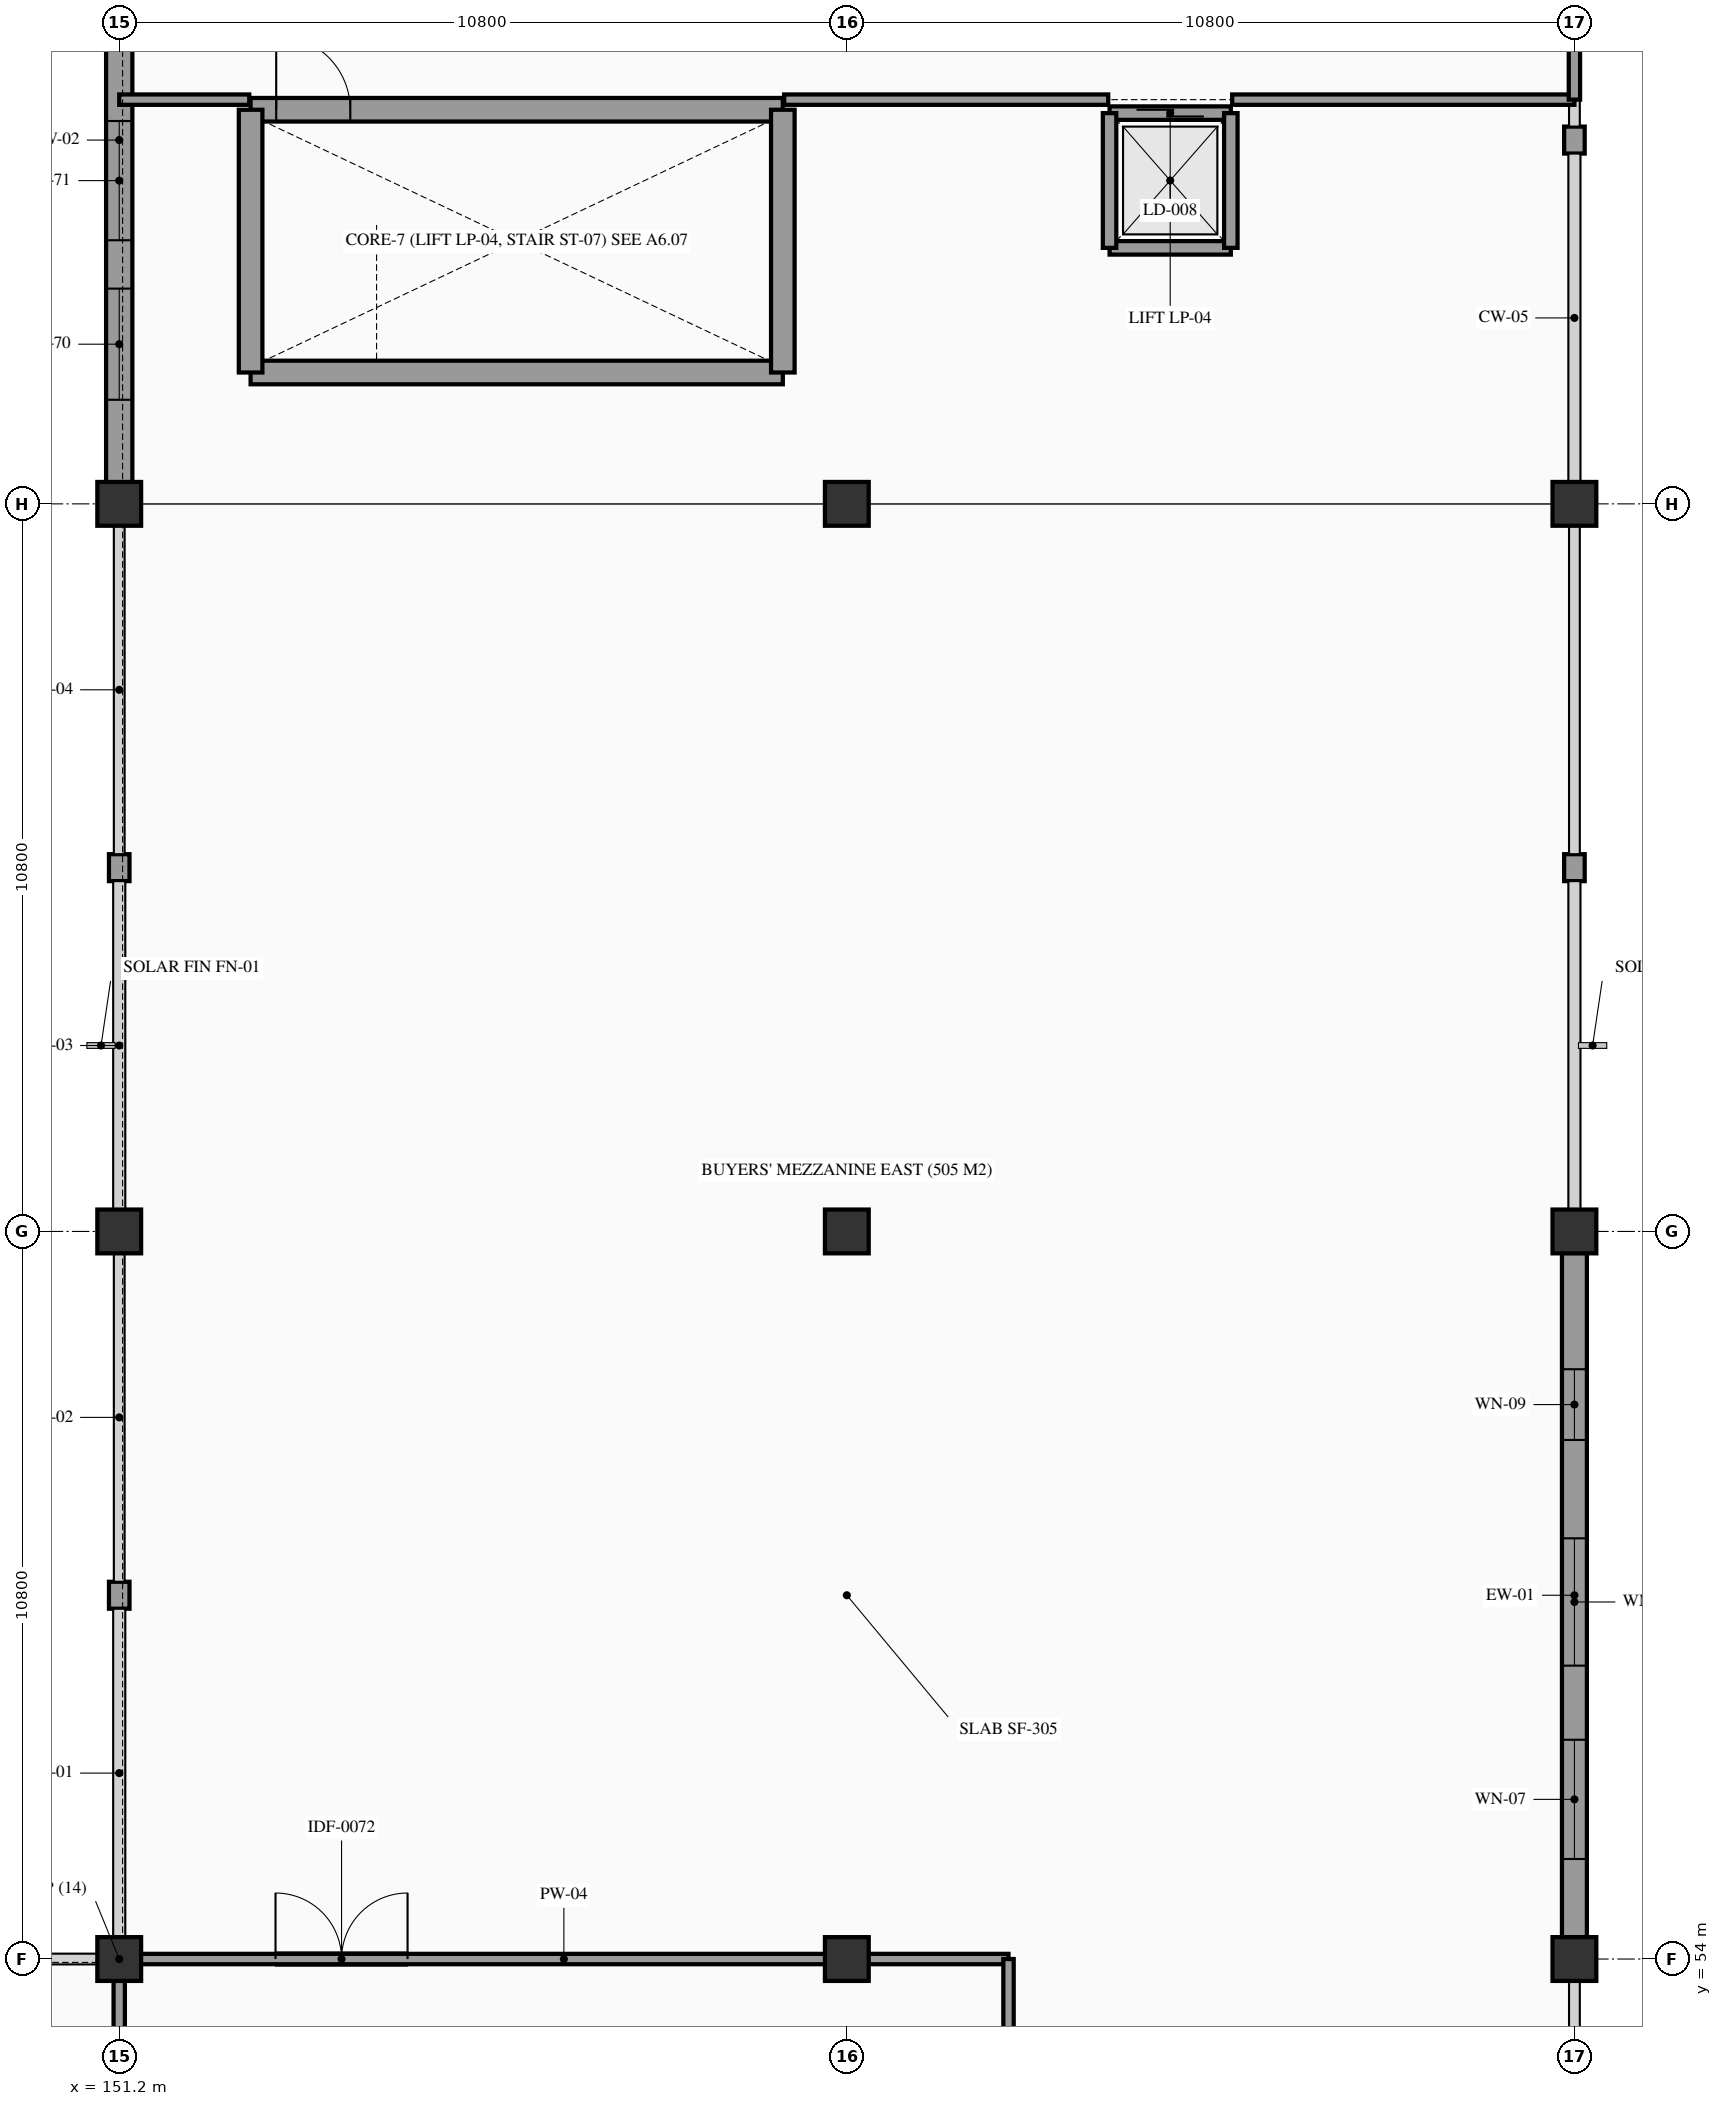
"""IFC4 building model, lengths in metres.
Left out: names, types, materials, properties, quantities, classifications, styles, units other than length and angle.
Written with IfcOpenShell. Run it as: python <this file> out.ifc"""

import sys

from ifc_helpers import new_model, si_unit, direction, frame, frame_2d, origin, origin_2d, place, context, subcontext, project, spatial, rectangle, extrude, element, fill, save


model = new_model("IFC4")
c1 = context("Model", 3, precision=1e-05, world=origin(), true_north=direction((0.0, 1.0)))
c2 = subcontext(c1, "Body", "Model", "MODEL_VIEW")
j1 = project(units=[si_unit("LENGTHUNIT", "METRE"), si_unit("PLANEANGLEUNIT", "RADIAN")], contexts=[c1])
p1 = place(None, origin())
s1 = spatial("IfcSite", under=j1, at=p1, CompositionType="ELEMENT")
p2 = place(p1, origin())
s2 = spatial("IfcBuilding", under=s1, at=p2, CompositionType="ELEMENT")
p3 = place(p2, frame((0.0, 0.0, 5.4)))
s3 = spatial("IfcBuildingStorey", under=s2, at=p3, CompositionType="ELEMENT", Elevation=5.4)
for number, where, z_axis, x_axis in (
    (1, (151.2, 54.0, 0.0), (0.0, 0.0, 1.0), (1.0, 0.0, 0.0)),
    (2, (151.2, 64.8, 0.0), (0.0, 0.0, 1.0), (1.0, 0.0, 0.0)),
    (3, (151.2, 75.6, 0.0), (0.0, 0.0, 1.0), (1.0, 0.0, 0.0)),
    (4, (162.0, 54.0, 0.0), (0.0, 0.0, 1.0), (1.0, 0.0, 0.0)),
    (5, (162.0, 64.8, 0.0), (0.0, 0.0, 1.0), (1.0, 0.0, 0.0)),
    (6, (162.0, 75.6, 0.0), (0.0, 0.0, 1.0), (1.0, 0.0, 0.0)),
    (7, (172.8, 54.0, 0.0), (0.0, 0.0, 1.0), (1.0, 0.0, 0.0)),
    (8, (172.8, 64.8, 0.0), (0.0, 0.0, 1.0), (1.0, 0.0, 0.0)),
    (9, (172.8, 75.6, 0.0), (0.0, 0.0, 1.0), (1.0, 0.0, 0.0)),
):
    element("IfcColumn", number, at=place(p3, frame(where, z_axis=z_axis, x_axis=x_axis)), inside=s3, PredefinedType="COLUMN", context=c2, shape_type="SweptSolid", body=[
        extrude(rectangle(XDim=0.65, YDim=0.65, at=origin_2d()), origin(), (0.0, 0.0, 1.0), 4.68),
    ])
p4 = place(p3, frame((151.2, 59.2, 0.0), z_axis=(0.0, 0.0, 1.0), x_axis=(0.0, 1.0, 0.0)))
e10 = element("IfcWall", 10, at=p4, inside=s3, PredefinedType="STANDARD", context=c2, shape_type="SweptSolid", body=[
    extrude(rectangle(XDim=0.4, YDim=0.305, at=frame_2d((0.2, 0.0))), origin(), (0.0, 0.0, 1.0), 3.53),
])
p5 = place(p3, frame((151.2, 70.0, 0.0), z_axis=(0.0, 0.0, 1.0), x_axis=(0.0, 1.0, 0.0)))
e11 = element("IfcWall", 11, at=p5, inside=s3, PredefinedType="STANDARD", context=c2, shape_type="SweptSolid", body=[
    extrude(rectangle(XDim=0.4, YDim=0.305, at=frame_2d((0.2, 0.0))), origin(), (0.0, 0.0, 1.0), 3.53),
])
p6 = place(p3, frame((151.2, 75.92, 0.0), z_axis=(0.0, 0.0, 1.0), x_axis=(0.0, 1.0, 0.0)))
e12 = element("IfcWall", 12, at=p6, inside=s3, PredefinedType="STANDARD", context=c2, shape_type="SweptSolid", body=[
    extrude(rectangle(XDim=10.16, YDim=0.39, at=frame_2d((5.08, 0.0))), origin(), (0.0, 0.0, 1.0), 3.53),
])
p7 = place(p6, frame((1.225, 0.0, 0.95)))
e13 = element("IfcOpeningElement", 13, at=p7, cuts=e12, PredefinedType="OPENING", context=c2, shape_type="SweptSolid", body=[
    extrude(rectangle(XDim=1.65, YDim=2.1, at=frame_2d((0.825, 1.05))), frame((0.0, 0.205, 0.0), z_axis=(0.0, -1.0, 0.0), x_axis=(1.0, 0.0, 0.0)), (0.0, 0.0, 1.0), 0.41),
])
p8 = place(p6, frame((3.593, 0.0, 0.95)))
e14 = element("IfcOpeningElement", 14, at=p8, cuts=e12, PredefinedType="OPENING", context=c2, shape_type="SweptSolid", body=[
    extrude(rectangle(XDim=1.77, YDim=2.1, at=frame_2d((0.885, 1.05))), frame((0.0, 0.205, 0.0), z_axis=(0.0, -1.0, 0.0), x_axis=(1.0, 0.0, 0.0)), (0.0, 0.0, 1.0), 0.41),
])
p9 = place(p6, frame((6.965, 0.0, 0.95)))
e15 = element("IfcOpeningElement", 15, at=p9, cuts=e12, PredefinedType="OPENING", context=c2, shape_type="SweptSolid", body=[
    extrude(rectangle(XDim=1.89, YDim=2.1, at=frame_2d((0.945, 1.05))), frame((0.0, 0.205, 0.0), z_axis=(0.0, -1.0, 0.0), x_axis=(1.0, 0.0, 0.0)), (0.0, 0.0, 1.0), 0.41),
])
p10 = place(p3, frame((172.8, 54.32, 0.0), z_axis=(0.0, 0.0, 1.0), x_axis=(0.0, 1.0, 0.0)))
e16 = element("IfcWall", 16, at=p10, inside=s3, PredefinedType="STANDARD", context=c2, shape_type="SweptSolid", body=[
    extrude(rectangle(XDim=10.16, YDim=0.37, at=frame_2d((5.08, 0.0))), origin(), (0.0, 0.0, 1.0), 2.38),
])
p11 = place(p10, frame((1.165, 0.0, 0.95)))
e17 = element("IfcOpeningElement", 17, at=p11, cuts=e16, PredefinedType="OPENING", context=c2, shape_type="SweptSolid", body=[
    extrude(rectangle(XDim=1.77, YDim=0.9, at=frame_2d((0.885, 0.45))), frame((0.0, 0.195, 0.0), z_axis=(0.0, -1.0, 0.0), x_axis=(1.0, 0.0, 0.0)), (0.0, 0.0, 1.0), 0.39),
])
p12 = place(p10, frame((4.035, 0.0, 0.95)))
e18 = element("IfcOpeningElement", 18, at=p12, cuts=e16, PredefinedType="OPENING", context=c2, shape_type="SweptSolid", body=[
    extrude(rectangle(XDim=1.89, YDim=0.9, at=frame_2d((0.945, 0.45))), frame((0.0, 0.195, 0.0), z_axis=(0.0, -1.0, 0.0), x_axis=(1.0, 0.0, 0.0)), (0.0, 0.0, 1.0), 0.39),
])
p13 = place(p10, frame((7.385, 0.0, 0.95)))
e19 = element("IfcOpeningElement", 19, at=p13, cuts=e16, PredefinedType="OPENING", context=c2, shape_type="SweptSolid", body=[
    extrude(rectangle(XDim=1.05, YDim=1.05, at=frame_2d((0.525, 0.525))), frame((0.0, 0.195, 0.0), z_axis=(0.0, -1.0, 0.0), x_axis=(1.0, 0.0, 0.0)), (0.0, 0.0, 1.0), 0.39),
])
for number, where, z_axis, x_axis in (
    (20, (172.8, 70.0, 0.0), (0.0, 0.0, 1.0), (0.0, 1.0, 0.0)),
    (21, (172.8, 80.8, 0.0), (0.0, 0.0, 1.0), (0.0, 1.0, 0.0)),
):
    element("IfcWall", number, at=place(p3, frame(where, z_axis=z_axis, x_axis=x_axis)), inside=s3, PredefinedType="STANDARD", context=c2, shape_type="SweptSolid", body=[
        extrude(rectangle(XDim=0.4, YDim=0.305, at=frame_2d((0.2, 0.0))), origin(), (0.0, 0.0, 1.0), 2.38),
    ])
p14 = place(p3, frame((153.15, 77.55, 0.0), z_axis=(0.0, 0.0, 1.0), x_axis=(1.0, 0.0, 0.0)))
e22 = element("IfcWall", 22, at=p14, inside=s3, PredefinedType="SHEAR", context=c2, shape_type="SweptSolid", body=[
    extrude(rectangle(XDim=7.9, YDim=0.35, at=frame_2d((3.95, 0.0))), origin(), (0.0, 0.0, 1.0), 4.68),
])
p15 = place(p3, frame((153.15, 81.45, 0.0), z_axis=(0.0, 0.0, 1.0), x_axis=(1.0, 0.0, 0.0)))
e23 = element("IfcWall", 23, at=p15, inside=s3, PredefinedType="SHEAR", context=c2, shape_type="SweptSolid", body=[
    extrude(rectangle(XDim=7.9, YDim=0.35, at=frame_2d((3.95, 0.0))), origin(), (0.0, 0.0, 1.0), 4.68),
])
p16 = place(p15, frame((0.38, 0.0, 0.0)))
e24 = element("IfcOpeningElement", 24, at=p16, cuts=e23, PredefinedType="OPENING", context=c2, shape_type="SweptSolid", body=[
    extrude(rectangle(XDim=1.1, YDim=2.2, at=frame_2d((0.55, 1.1))), frame((0.0, 0.185, 0.0), z_axis=(0.0, -1.0, 0.0), x_axis=(1.0, 0.0, 0.0)), (0.0, 0.0, 1.0), 0.37),
])
for number, where, z_axis, x_axis in (
    (25, (153.15, 77.55, 0.0), (0.0, 0.0, 1.0), (0.0, 1.0, 0.0)),
    (26, (161.05, 77.55, 0.0), (0.0, 0.0, 1.0), (0.0, 1.0, 0.0)),
):
    element("IfcWall", number, at=place(p3, frame(where, z_axis=z_axis, x_axis=x_axis)), inside=s3, PredefinedType="SHEAR", context=c2, shape_type="SweptSolid", body=[
        extrude(rectangle(XDim=3.9, YDim=0.35, at=frame_2d((1.95, 0.0))), origin(), (0.0, 0.0, 1.0), 4.68),
    ])
p17 = place(p3, frame((165.9, 79.4, 0.0), z_axis=(0.0, 0.0, 1.0), x_axis=(1.0, 0.0, 0.0)))
e27 = element("IfcWall", 27, at=p17, inside=s3, PredefinedType="SOLIDWALL", context=c2, shape_type="SweptSolid", body=[
    extrude(rectangle(XDim=1.8, YDim=0.2, at=frame_2d((0.9, 0.0))), origin(), (0.0, 0.0, 1.0), 3.5),
])
p18 = place(p3, frame((165.9, 81.4, 0.0), z_axis=(0.0, 0.0, 1.0), x_axis=(1.0, 0.0, 0.0)))
e28 = element("IfcWall", 28, at=p18, inside=s3, PredefinedType="SOLIDWALL", context=c2, shape_type="SweptSolid", body=[
    extrude(rectangle(XDim=1.8, YDim=0.2, at=frame_2d((0.9, 0.0))), origin(), (0.0, 0.0, 1.0), 3.5),
])
p19 = place(p18, frame((0.4, 0.0, 0.0)))
e29 = element("IfcOpeningElement", 29, at=p19, cuts=e28, PredefinedType="OPENING", context=c2, shape_type="SweptSolid", body=[
    extrude(rectangle(XDim=1.0, YDim=2.15, at=frame_2d((0.5, 1.075))), frame((0.0, 0.11, 0.0), z_axis=(0.0, -1.0, 0.0), x_axis=(1.0, 0.0, 0.0)), (0.0, 0.0, 1.0), 0.22),
])
for number, where, z_axis, x_axis in (
    (30, (165.9, 79.4, 0.0), (0.0, 0.0, 1.0), (0.0, 1.0, 0.0)),
    (31, (167.7, 79.4, 0.0), (0.0, 0.0, 1.0), (0.0, 1.0, 0.0)),
):
    element("IfcWall", number, at=place(p3, frame(where, z_axis=z_axis, x_axis=x_axis)), inside=s3, PredefinedType="SOLIDWALL", context=c2, shape_type="SweptSolid", body=[
        extrude(rectangle(XDim=2.0, YDim=0.2, at=frame_2d((1.0, 0.0))), origin(), (0.0, 0.0, 1.0), 3.5),
    ])
p20 = place(p3, frame((151.2, 48.6, 0.0), z_axis=(0.0, 0.0, 1.0), x_axis=(0.0, 1.0, 0.0)))
e32 = element("IfcWall", 32, at=p20, inside=s3, PredefinedType="PARTITIONING", context=c2, shape_type="SweptSolid", body=[
    extrude(rectangle(XDim=5.4, YDim=0.168, at=frame_2d((2.7, 0.0))), origin(), (0.0, 0.0, 1.0), 3.23),
])
p21 = place(p20, frame((0.37, 0.0, 0.0)))
e33 = element("IfcOpeningElement", 33, at=p21, cuts=e32, PredefinedType="OPENING", context=c2, shape_type="SweptSolid", body=[
    extrude(rectangle(XDim=1.96, YDim=2.3, at=frame_2d((0.98, 1.15))), frame((0.0, 0.094, 0.0), z_axis=(0.0, -1.0, 0.0), x_axis=(1.0, 0.0, 0.0)), (0.0, 0.0, 1.0), 0.188),
])
p22 = place(p3, frame((151.2, 54.0, 0.0), z_axis=(0.0, 0.0, 1.0), x_axis=(1.0, 0.0, 0.0)))
e34 = element("IfcWall", 34, at=p22, inside=s3, PredefinedType="PARTITIONING", context=c2, shape_type="SweptSolid", body=[
    extrude(rectangle(XDim=13.2, YDim=0.154, at=frame_2d((6.6, 0.0))), origin(), (0.0, 0.0, 1.0), 3.23),
])
p23 = place(p22, frame((2.32, 0.0, 0.0)))
e35 = element("IfcOpeningElement", 35, at=p23, cuts=e34, PredefinedType="OPENING", context=c2, shape_type="SweptSolid", body=[
    extrude(rectangle(XDim=1.96, YDim=2.3, at=frame_2d((0.98, 1.15))), frame((0.0, 0.087, 0.0), z_axis=(0.0, -1.0, 0.0), x_axis=(1.0, 0.0, 0.0)), (0.0, 0.0, 1.0), 0.174),
])
p24 = place(p3, frame((151.2, 81.6, 0.0), z_axis=(0.0, 0.0, 1.0), x_axis=(1.0, 0.0, 0.0)))
e36 = element("IfcWall", 36, at=p24, inside=s3, PredefinedType="PARTITIONING", context=c2, shape_type="SweptSolid", body=[
    extrude(rectangle(XDim=1.93, YDim=0.154, at=frame_2d((0.965, 0.0))), origin(), (0.0, 0.0, 1.0), 3.23),
])
p25 = place(p3, frame((161.07, 81.6, 0.0), z_axis=(0.0, 0.0, 1.0), x_axis=(1.0, 0.0, 0.0)))
e37 = element("IfcWall", 37, at=p25, inside=s3, PredefinedType="PARTITIONING", context=c2, shape_type="SweptSolid", body=[
    extrude(rectangle(XDim=4.81, YDim=0.154, at=frame_2d((2.405, 0.0))), origin(), (0.0, 0.0, 1.0), 3.23),
])
p26 = place(p3, frame((167.72, 81.6, 0.0), z_axis=(0.0, 0.0, 1.0), x_axis=(1.0, 0.0, 0.0)))
e38 = element("IfcWall", 38, at=p26, inside=s3, PredefinedType="PARTITIONING", context=c2, shape_type="SweptSolid", body=[
    extrude(rectangle(XDim=5.08, YDim=0.154, at=frame_2d((2.54, 0.0))), origin(), (0.0, 0.0, 1.0), 3.23),
])
p27 = place(p3, frame((164.4, 48.6, 0.0), z_axis=(0.0, 0.0, 1.0), x_axis=(0.0, 1.0, 0.0)))
e39 = element("IfcWall", 39, at=p27, inside=s3, PredefinedType="PARTITIONING", context=c2, shape_type="SweptSolid", body=[
    extrude(rectangle(XDim=5.4, YDim=0.154, at=frame_2d((2.7, 0.0))), origin(), (0.0, 0.0, 1.0), 3.23),
])
p28 = place(p3, frame((172.8, 81.6, 0.0), z_axis=(0.0, 0.0, 1.0), x_axis=(0.0, 1.0, 0.0)))
e40 = element("IfcWall", 40, at=p28, inside=s3, PredefinedType="PARTITIONING", context=c2, shape_type="SweptSolid", body=[
    extrude(rectangle(XDim=4.8, YDim=0.168, at=frame_2d((2.4, 0.0))), origin(), (0.0, 0.0, 1.0), 2.38),
])
p29 = place(p7, origin())
e41 = element("IfcWindow", 41, at=p29, inside=s3, PartitioningType="SINGLE_PANEL", PredefinedType="WINDOW", context=c2, shape_type="SweptSolid", body=[
    extrude(rectangle(XDim=1.65, YDim=2.1, at=frame_2d((0.825, 1.05))), frame((0.0, 0.03, 0.0), z_axis=(0.0, -1.0, 0.0), x_axis=(1.0, 0.0, 0.0)), (0.0, 0.0, 1.0), 0.06),
])
fill(e13, e41)
p30 = place(p8, origin())
e42 = element("IfcWindow", 42, at=p30, inside=s3, PartitioningType="SINGLE_PANEL", PredefinedType="WINDOW", context=c2, shape_type="SweptSolid", body=[
    extrude(rectangle(XDim=1.77, YDim=2.1, at=frame_2d((0.885, 1.05))), frame((0.0, 0.03, 0.0), z_axis=(0.0, -1.0, 0.0), x_axis=(1.0, 0.0, 0.0)), (0.0, 0.0, 1.0), 0.06),
])
fill(e14, e42)
p31 = place(p11, frame((1.77, 0.0, 0.0), z_axis=(0.0, 0.0, 1.0), x_axis=(-1.0, 0.0, 0.0)))
e43 = element("IfcWindow", 43, at=p31, inside=s3, PartitioningType="SINGLE_PANEL", PredefinedType="WINDOW", context=c2, shape_type="SweptSolid", body=[
    extrude(rectangle(XDim=1.77, YDim=0.9, at=frame_2d((0.885, 0.45))), frame((0.0, 0.03, 0.0), z_axis=(0.0, -1.0, 0.0), x_axis=(1.0, 0.0, 0.0)), (0.0, 0.0, 1.0), 0.06),
])
fill(e17, e43)
p32 = place(p12, frame((1.89, 0.0, 0.0), z_axis=(0.0, 0.0, 1.0), x_axis=(-1.0, 0.0, 0.0)))
e44 = element("IfcWindow", 44, at=p32, inside=s3, PartitioningType="SINGLE_PANEL", PredefinedType="WINDOW", context=c2, shape_type="SweptSolid", body=[
    extrude(rectangle(XDim=1.89, YDim=0.9, at=frame_2d((0.945, 0.45))), frame((0.0, 0.03, 0.0), z_axis=(0.0, -1.0, 0.0), x_axis=(1.0, 0.0, 0.0)), (0.0, 0.0, 1.0), 0.06),
])
fill(e18, e44)
p33 = place(p13, frame((1.05, 0.0, 0.0), z_axis=(0.0, 0.0, 1.0), x_axis=(-1.0, 0.0, 0.0)))
e45 = element("IfcWindow", 45, at=p33, inside=s3, PartitioningType="SINGLE_PANEL", PredefinedType="WINDOW", context=c2, shape_type="SweptSolid", body=[
    extrude(rectangle(XDim=1.05, YDim=1.05, at=frame_2d((0.525, 0.525))), frame((0.0, 0.03, 0.0), z_axis=(0.0, -1.0, 0.0), x_axis=(1.0, 0.0, 0.0)), (0.0, 0.0, 1.0), 0.06),
])
fill(e19, e45)
p34 = place(p16, origin())
e46 = element("IfcDoor", 46, at=p34, inside=s3, OperationType="SINGLE_SWING_LEFT", PredefinedType="DOOR", context=c2, shape_type="SweptSolid", body=[
    extrude(rectangle(XDim=1.1, YDim=2.2, at=frame_2d((0.55, 1.1))), frame((0.0, 0.025, 0.0), z_axis=(0.0, -1.0, 0.0), x_axis=(1.0, 0.0, 0.0)), (0.0, 0.0, 1.0), 0.05),
])
fill(e24, e46)
p35 = place(p19, origin())
e47 = element("IfcDoor", 47, at=p35, inside=s3, OperationType="DOUBLE_DOOR_SLIDING", PredefinedType="DOOR", context=c2, shape_type="SweptSolid", body=[
    extrude(rectangle(XDim=1.0, YDim=2.15, at=frame_2d((0.5, 1.075))), frame((0.0, 0.025, 0.0), z_axis=(0.0, -1.0, 0.0), x_axis=(1.0, 0.0, 0.0)), (0.0, 0.0, 1.0), 0.05),
])
fill(e29, e47)
p36 = place(p23, frame((1.96, 0.0, 0.0), z_axis=(0.0, 0.0, 1.0), x_axis=(-1.0, 0.0, 0.0)))
e48 = element("IfcDoor", 48, at=p36, inside=s3, OperationType="DOUBLE_DOOR_SINGLE_SWING", PredefinedType="DOOR", context=c2, shape_type="SweptSolid", body=[
    extrude(rectangle(XDim=1.96, YDim=2.3, at=frame_2d((0.98, 1.15))), frame((0.0, 0.025, 0.0), z_axis=(0.0, -1.0, 0.0), x_axis=(1.0, 0.0, 0.0)), (0.0, 0.0, 1.0), 0.05),
])
fill(e35, e48)
save(model, sys.argv[1])
